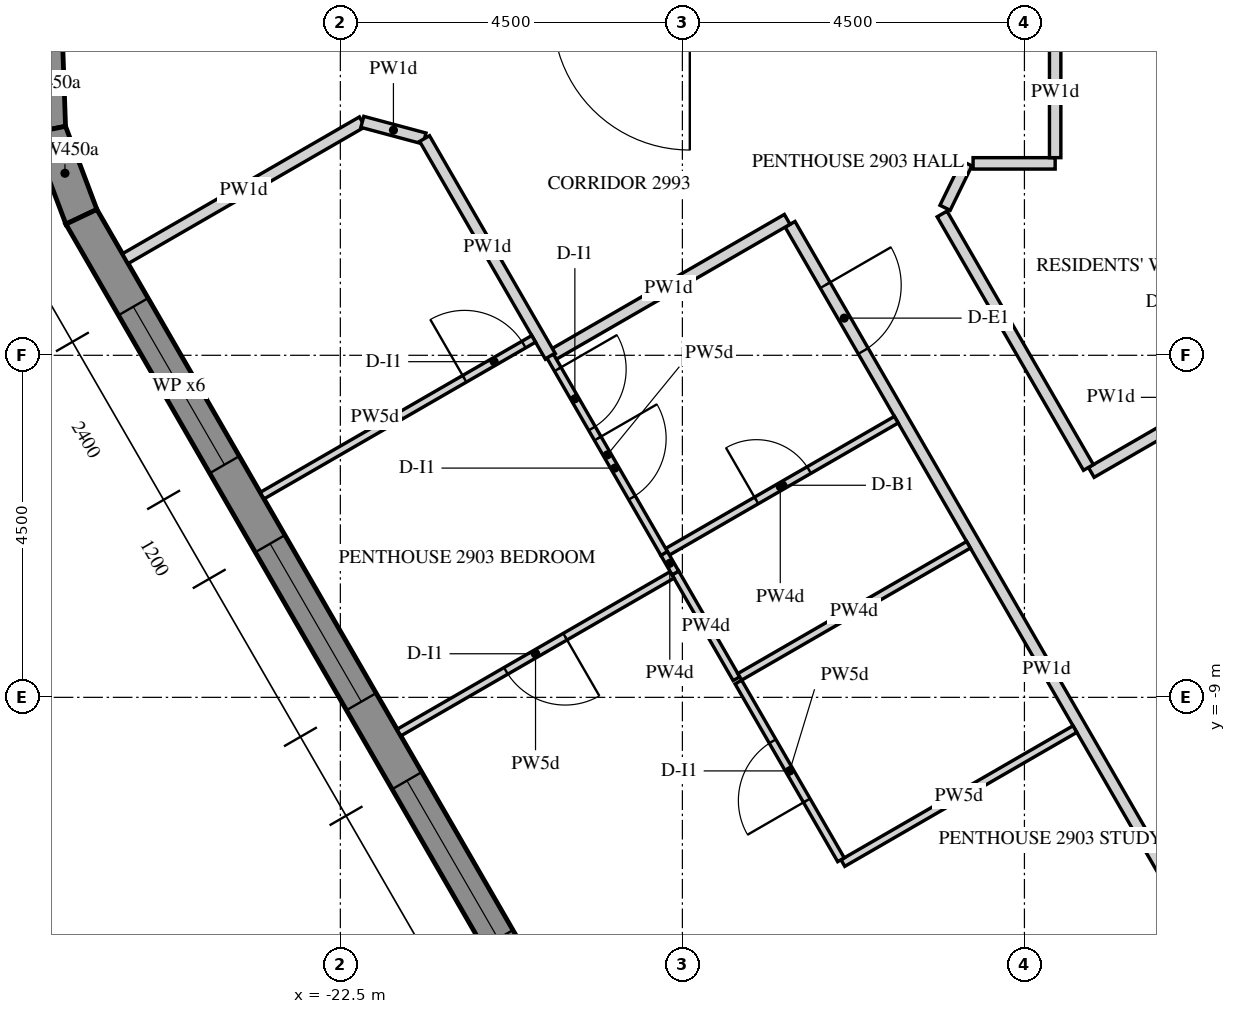
"""IFC4 building model, lengths in metres.
Left out: names, types, materials, properties, quantities, classifications, styles, units other than length and angle.
Written with IfcOpenShell. Run it as: python <this file> out.ifc"""

import sys

from ifc_helpers import new_model, si_unit, direction, frame, frame_2d, origin, place, context, subcontext, project, spatial, polyline, rectangle, outline, extrude, element, fill, save


model = new_model("IFC4")
c1 = context("Model", 3, precision=1e-05, world=origin(), true_north=direction((0.0, 1.0)))
c2 = subcontext(c1, "Body", "Model", "MODEL_VIEW")
j1 = project(units=[si_unit("LENGTHUNIT", "METRE"), si_unit("PLANEANGLEUNIT", "RADIAN")], contexts=[c1])
p1 = place(None, origin())
s1 = spatial("IfcSite", under=j1, at=p1, CompositionType="ELEMENT")
p2 = place(p1, origin())
s2 = spatial("IfcBuilding", under=s1, at=p2, CompositionType="ELEMENT")
p3 = place(p2, frame((0.0, 0.0, 372.9)))
s3 = spatial("IfcBuildingStorey", under=s2, at=p3, CompositionType="ELEMENT", Elevation=372.9)
p4 = place(p3, frame((-26.382, -0.309, -0.15), z_axis=(0.0, 0.0, 1.0), x_axis=(0.034887984255, -0.999391228976, 0.0)))
e1 = element("IfcWall", 1, at=p4, inside=s3, PredefinedType="SOLIDWALL", context=c2, shape_type="SweptSolid", body=[
    extrude(outline(polyline([(-0.037, -0.225), (1.261, -0.225), (1.188, 0.225), (0.037, 0.225), (-0.037, -0.225)])), origin(), (0.0, 0.0, 1.0), 3.55),
])
p5 = place(p3, frame((-26.339, -1.532, -0.15), z_axis=(0.0, 0.0, 1.0), x_axis=(0.353132996235, -0.935573132882, 0.0)))
e2 = element("IfcWall", 2, at=p5, inside=s3, PredefinedType="SOLIDWALL", context=c2, shape_type="SweptSolid", body=[
    extrude(outline(polyline([(-0.037, -0.225), (1.243, -0.225), (1.206, 0.225), (0.037, 0.225), (-0.037, -0.225)])), origin(), (0.0, 0.0, 1.0), 3.55),
])
p6 = place(p3, frame((-25.907, -2.678, -0.15), z_axis=(0.0, 0.0, 1.0), x_axis=(0.499997453958, -0.866026873738, 0.0)))
e3 = element("IfcWall", 3, at=p6, inside=s3, PredefinedType="SOLIDWALL", context=c2, shape_type="SweptSolid", body=[
    extrude(outline(polyline([(-0.018, -0.225), (23.152, -0.225), (23.11, 0.225), (0.018, 0.225), (-0.018, -0.225)])), origin(), (0.0, 0.0, 1.0), 3.55),
])
p7 = place(p6, frame((1.366, 0.0, 0.45)))
e4 = element("IfcOpeningElement", 4, at=p7, cuts=e3, PredefinedType="OPENING", context=c2, shape_type="SweptSolid", body=[
    extrude(rectangle(XDim=2.4, YDim=3.0, at=frame_2d((1.2, 1.5))), frame((0.0, 0.235, 0.0), z_axis=(0.0, -1.0, 0.0), x_axis=(1.0, 0.0, 0.0)), (0.0, 0.0, 1.0), 0.47),
])
p8 = place(p6, frame((4.966, 0.0, 0.45)))
e5 = element("IfcOpeningElement", 5, at=p8, cuts=e3, PredefinedType="OPENING", context=c2, shape_type="SweptSolid", body=[
    extrude(rectangle(XDim=2.4, YDim=3.0, at=frame_2d((1.2, 1.5))), frame((0.0, 0.235, 0.0), z_axis=(0.0, -1.0, 0.0), x_axis=(1.0, 0.0, 0.0)), (0.0, 0.0, 1.0), 0.47),
])
p9 = place(p6, frame((8.566, 0.0, 0.45)))
e6 = element("IfcOpeningElement", 6, at=p9, cuts=e3, PredefinedType="OPENING", context=c2, shape_type="SweptSolid", body=[
    extrude(rectangle(XDim=2.4, YDim=3.0, at=frame_2d((1.2, 1.5))), frame((0.0, 0.235, 0.0), z_axis=(0.0, -1.0, 0.0), x_axis=(1.0, 0.0, 0.0)), (0.0, 0.0, 1.0), 0.47),
])
p10 = place(p6, frame((12.166, 0.0, 0.45)))
e7 = element("IfcOpeningElement", 7, at=p10, cuts=e3, PredefinedType="OPENING", context=c2, shape_type="SweptSolid", body=[
    extrude(rectangle(XDim=2.4, YDim=3.0, at=frame_2d((1.2, 1.5))), frame((0.0, 0.235, 0.0), z_axis=(0.0, -1.0, 0.0), x_axis=(1.0, 0.0, 0.0)), (0.0, 0.0, 1.0), 0.47),
])
p11 = place(p6, frame((15.766, 0.0, 0.45)))
e8 = element("IfcOpeningElement", 8, at=p11, cuts=e3, PredefinedType="OPENING", context=c2, shape_type="SweptSolid", body=[
    extrude(rectangle(XDim=2.4, YDim=3.0, at=frame_2d((1.2, 1.5))), frame((0.0, 0.235, 0.0), z_axis=(0.0, -1.0, 0.0), x_axis=(1.0, 0.0, 0.0)), (0.0, 0.0, 1.0), 0.47),
])
p12 = place(p6, frame((19.366, 0.0, 0.45)))
e9 = element("IfcOpeningElement", 9, at=p12, cuts=e3, PredefinedType="OPENING", context=c2, shape_type="SweptSolid", body=[
    extrude(rectangle(XDim=2.4, YDim=3.0, at=frame_2d((1.2, 1.5))), frame((0.0, 0.235, 0.0), z_axis=(0.0, -1.0, 0.0), x_axis=(1.0, 0.0, 0.0)), (0.0, 0.0, 1.0), 0.47),
])
p13 = place(p3, frame((-16.583, -2.777, 0.0), z_axis=(0.0, 0.0, 1.0), x_axis=(0.50000467473, -0.866022704811, 0.0)))
e10 = element("IfcWall", 10, at=p13, inside=s3, PredefinedType="PARTITIONING", context=c2, shape_type="SweptSolid", body=[
    extrude(rectangle(XDim=13.504, YDim=0.15, at=frame_2d((6.752, 0.0))), origin(), (0.0, 0.0, 1.0), 2.47),
])
p14 = place(p13, frame((0.925, 0.0, 0.0)))
e11 = element("IfcOpeningElement", 11, at=p14, cuts=e10, PredefinedType="OPENING", context=c2, shape_type="SweptSolid", body=[
    extrude(rectangle(XDim=1.0, YDim=2.1, at=frame_2d((0.5, 1.05))), frame((0.0, 0.085, 0.0), z_axis=(0.0, -1.0, 0.0), x_axis=(1.0, 0.0, 0.0)), (0.0, 0.0, 1.0), 0.17),
])
p15 = place(p3, frame((-19.739, -4.512, 0.0), z_axis=(0.0, 0.0, 1.0), x_axis=(0.866018442252, 0.500012057535, 0.0)))
e12 = element("IfcWall", 12, at=p15, inside=s3, PredefinedType="PARTITIONING", context=c2, shape_type="SweptSolid", body=[
    extrude(rectangle(XDim=3.6, YDim=0.15, at=frame_2d((1.8, 0.0))), origin(), (0.0, 0.0, 1.0), 2.47),
])
p16 = place(p3, frame((-25.329, -3.229, 0.0), z_axis=(0.0, 0.0, 1.0), x_axis=(0.866030854095, 0.499990559667, 0.0)))
e13 = element("IfcWall", 13, at=p16, inside=s3, PredefinedType="PARTITIONING", context=c2, shape_type="SweptSolid", body=[
    extrude(rectangle(XDim=3.6, YDim=0.15, at=frame_2d((1.8, 0.0))), origin(), (0.0, 0.0, 1.0), 2.47),
])
p17 = place(p3, frame((-22.211, -1.429, 0.0), z_axis=(0.0, 0.0, 1.0), x_axis=(0.965937762102, -0.258774495933, 0.0)))
e14 = element("IfcWall", 14, at=p17, inside=s3, PredefinedType="PARTITIONING", context=c2, shape_type="SweptSolid", body=[
    extrude(rectangle(XDim=0.847, YDim=0.15, at=frame_2d((0.424, 0.0))), origin(), (0.0, 0.0, 1.0), 2.47),
])
p18 = place(p3, frame((-21.392, -1.648, 0.0), z_axis=(0.0, 0.0, 1.0), x_axis=(0.500018282537, -0.866014848099, 0.0)))
e15 = element("IfcWall", 15, at=p18, inside=s3, PredefinedType="PARTITIONING", context=c2, shape_type="SweptSolid", body=[
    extrude(rectangle(XDim=3.31, YDim=0.15, at=frame_2d((1.655, 0.0))), origin(), (0.0, 0.0, 1.0), 2.47),
])
p19 = place(p3, frame((-9.2, -4.066, 0.0), z_axis=(0.0, 0.0, 1.0), x_axis=(-0.866020906874, -0.500007788796, 0.0)))
e16 = element("IfcWall", 16, at=p19, inside=s3, PredefinedType="PARTITIONING", context=c2, shape_type="SweptSolid", body=[
    extrude(rectangle(XDim=3.95, YDim=0.15, at=frame_2d((1.975, 0.0))), origin(), (0.0, 0.0, 1.0), 2.47),
])
p20 = place(p19, frame((1.525, 0.0, 0.0)))
e17 = element("IfcOpeningElement", 17, at=p20, cuts=e16, PredefinedType="OPENING", context=c2, shape_type="SweptSolid", body=[
    extrude(rectangle(XDim=0.9, YDim=2.1, at=frame_2d((0.45, 1.05))), frame((0.0, 0.085, 0.0), z_axis=(0.0, -1.0, 0.0), x_axis=(1.0, 0.0, 0.0)), (0.0, 0.0, 1.0), 0.17),
])
p21 = place(p3, frame((-12.658, -5.976, 0.0), z_axis=(0.0, 0.0, 1.0), x_axis=(-0.499991345342, 0.866030400496, 0.0)))
e18 = element("IfcWall", 18, at=p21, inside=s3, PredefinedType="PARTITIONING", context=c2, shape_type="SweptSolid", body=[
    extrude(rectangle(XDim=3.851, YDim=0.15, at=frame_2d((1.926, 0.0))), origin(), (0.0, 0.0, 1.0), 2.47),
])
p22 = place(p3, frame((-14.544, -2.559, 0.0), z_axis=(0.0, 0.0, 1.0), x_axis=(0.438630789999, 0.898667363414, 0.0)))
e19 = element("IfcWall", 19, at=p22, inside=s3, PredefinedType="PARTITIONING", context=c2, shape_type="SweptSolid", body=[
    extrude(rectangle(XDim=0.65, YDim=0.15, at=frame_2d((0.325, 0.0))), origin(), (0.0, 0.0, 1.0), 2.47),
])
p23 = place(p3, frame((-14.176, -1.975, 0.0), z_axis=(0.0, 0.0, 1.0), x_axis=(1.0, 0.0, 0.0)))
e20 = element("IfcWall", 20, at=p23, inside=s3, PredefinedType="PARTITIONING", context=c2, shape_type="SweptSolid", body=[
    extrude(rectangle(XDim=1.08, YDim=0.15, at=frame_2d((0.54, 0.0))), origin(), (0.0, 0.0, 1.0), 2.47),
])
p24 = place(p3, frame((-13.096, -1.9, 0.0), z_axis=(0.0, 0.0, 1.0), x_axis=(0.0, 1.0, 0.0)))
e21 = element("IfcWall", 21, at=p24, inside=s3, PredefinedType="PARTITIONING", context=c2, shape_type="SweptSolid", body=[
    extrude(rectangle(XDim=1.725, YDim=0.15, at=frame_2d((0.862, 0.0))), origin(), (0.0, 0.0, 1.0), 2.47),
])
p25 = place(p3, frame((-17.289, -8.755, 0.0), z_axis=(0.0, 0.0, 1.0), x_axis=(-0.499958946799, 0.866049104564, 0.0)))
e22 = element("IfcWall", 22, at=p25, inside=s3, PredefinedType="PARTITIONING", context=c2, shape_type="SweptSolid", body=[
    extrude(rectangle(XDim=1.609, YDim=0.1, at=frame_2d((0.804, 0.0))), origin(), (0.0, 0.0, 1.0), 2.47),
])
p26 = place(p3, frame((-18.135, -7.389, 0.0), z_axis=(0.0, 0.0, 1.0), x_axis=(-0.86602981871, -0.499992353047, 0.0)))
e23 = element("IfcWall", 23, at=p26, inside=s3, PredefinedType="PARTITIONING", context=c2, shape_type="SweptSolid", body=[
    extrude(rectangle(XDim=4.15, YDim=0.1, at=frame_2d((2.075, 0.0))), origin(), (0.0, 0.0, 1.0), 2.47),
])
p27 = place(p26, frame((1.625, 0.0, 0.0)))
e24 = element("IfcOpeningElement", 24, at=p27, cuts=e23, PredefinedType="OPENING", context=c2, shape_type="SweptSolid", body=[
    extrude(rectangle(XDim=0.9, YDim=2.1, at=frame_2d((0.45, 1.05))), frame((0.0, 0.06, 0.0), z_axis=(0.0, -1.0, 0.0), x_axis=(1.0, 0.0, 0.0)), (0.0, 0.0, 1.0), 0.12),
])
p28 = place(p3, frame((-12.836, -9.418, 0.0), z_axis=(0.0, 0.0, 1.0), x_axis=(-0.866031034943, -0.499990246421, 0.0)))
e25 = element("IfcWall", 25, at=p28, inside=s3, PredefinedType="PARTITIONING", context=c2, shape_type="SweptSolid", body=[
    extrude(rectangle(XDim=3.525, YDim=0.1, at=frame_2d((1.762, 0.0))), origin(), (0.0, 0.0, 1.0), 2.47),
])
p29 = place(p3, frame((-15.914, -11.137, 0.0), z_axis=(0.0, 0.0, 1.0), x_axis=(-0.50000943426, 0.866019956843, 0.0)))
e26 = element("IfcWall", 26, at=p29, inside=s3, PredefinedType="PARTITIONING", context=c2, shape_type="SweptSolid", body=[
    extrude(rectangle(XDim=2.7, YDim=0.1, at=frame_2d((1.35, 0.0))), origin(), (0.0, 0.0, 1.0), 2.47),
])
p30 = place(p29, frame((0.9, 0.0, 0.0)))
e27 = element("IfcOpeningElement", 27, at=p30, cuts=e26, PredefinedType="OPENING", context=c2, shape_type="SweptSolid", body=[
    extrude(rectangle(XDim=0.9, YDim=2.1, at=frame_2d((0.45, 1.05))), frame((0.0, 0.06, 0.0), z_axis=(0.0, -1.0, 0.0), x_axis=(1.0, 0.0, 0.0)), (0.0, 0.0, 1.0), 0.12),
])
p31 = place(p3, frame((-18.239, -7.11, 0.0), z_axis=(0.0, 0.0, 1.0), x_axis=(0.866031034943, 0.499990246421, 0.0)))
e28 = element("IfcWall", 28, at=p31, inside=s3, PredefinedType="PARTITIONING", context=c2, shape_type="SweptSolid", body=[
    extrude(rectangle(XDim=3.525, YDim=0.1, at=frame_2d((1.762, 0.0))), origin(), (0.0, 0.0, 1.0), 2.47),
])
p32 = place(p31, frame((1.4, 0.0, 0.0)))
e29 = element("IfcOpeningElement", 29, at=p32, cuts=e28, PredefinedType="OPENING", context=c2, shape_type="SweptSolid", body=[
    extrude(rectangle(XDim=0.8, YDim=2.1, at=frame_2d((0.4, 1.05))), frame((0.0, 0.06, 0.0), z_axis=(0.0, -1.0, 0.0), x_axis=(1.0, 0.0, 0.0)), (0.0, 0.0, 1.0), 0.12),
])
p33 = place(p3, frame((-19.74, -4.51, 0.0), z_axis=(0.0, 0.0, 1.0), x_axis=(0.499985098601, -0.86603400694, 0.0)))
e30 = element("IfcWall", 30, at=p33, inside=s3, PredefinedType="PARTITIONING", context=c2, shape_type="SweptSolid", body=[
    extrude(rectangle(XDim=3.004, YDim=0.1, at=frame_2d((1.502, 0.0))), origin(), (0.0, 0.0, 1.0), 2.47),
])
p34 = place(p33, frame((0.2, 0.0, 0.0)))
e31 = element("IfcOpeningElement", 31, at=p34, cuts=e30, PredefinedType="OPENING", context=c2, shape_type="SweptSolid", body=[
    extrude(rectangle(XDim=0.9, YDim=2.1, at=frame_2d((0.45, 1.05))), frame((0.0, 0.06, 0.0), z_axis=(0.0, -1.0, 0.0), x_axis=(1.0, 0.0, 0.0)), (0.0, 0.0, 1.0), 0.12),
])
p35 = place(p33, frame((1.252, 0.0, 0.0)))
e32 = element("IfcOpeningElement", 32, at=p35, cuts=e30, PredefinedType="OPENING", context=c2, shape_type="SweptSolid", body=[
    extrude(rectangle(XDim=0.9, YDim=2.1, at=frame_2d((0.45, 1.05))), frame((0.0, 0.06, 0.0), z_axis=(0.0, -1.0, 0.0), x_axis=(1.0, 0.0, 0.0)), (0.0, 0.0, 1.0), 0.12),
])
p36 = place(p3, frame((-18.24, -7.108, 0.0), z_axis=(0.0, 0.0, 1.0), x_axis=(0.499960902066, -0.86604797581, 0.0)))
e33 = element("IfcWall", 33, at=p36, inside=s3, PredefinedType="PARTITIONING", context=c2, shape_type="SweptSolid", body=[
    extrude(rectangle(XDim=0.295, YDim=0.1, at=frame_2d((0.148, 0.0))), origin(), (0.0, 0.0, 1.0), 2.47),
])
p37 = place(p3, frame((-17.245, -8.73, 0.0), z_axis=(0.0, 0.0, 1.0), x_axis=(0.866055725969, 0.499947476758, 0.0)))
e34 = element("IfcWall", 34, at=p37, inside=s3, PredefinedType="PARTITIONING", context=c2, shape_type="SweptSolid", body=[
    extrude(rectangle(XDim=3.475, YDim=0.1, at=frame_2d((1.737, 0.0))), origin(), (0.0, 0.0, 1.0), 2.47),
])
p38 = place(p3, frame((-23.529, -6.346, 0.0), z_axis=(0.0, 0.0, 1.0), x_axis=(0.866019999656, 0.500009360108, 0.0)))
e35 = element("IfcWall", 35, at=p38, inside=s3, PredefinedType="PARTITIONING", context=c2, shape_type="SweptSolid", body=[
    extrude(rectangle(XDim=4.125, YDim=0.1, at=frame_2d((2.062, 0.0))), origin(), (0.0, 0.0, 1.0), 2.47),
])
p39 = place(p38, frame((3.075, 0.0, 0.0)))
e36 = element("IfcOpeningElement", 36, at=p39, cuts=e35, PredefinedType="OPENING", context=c2, shape_type="SweptSolid", body=[
    extrude(rectangle(XDim=0.9, YDim=2.1, at=frame_2d((0.45, 1.05))), frame((0.0, 0.06, 0.0), z_axis=(0.0, -1.0, 0.0), x_axis=(1.0, 0.0, 0.0)), (0.0, 0.0, 1.0), 0.12),
])
p40 = place(p7, frame((0.0, 0.155, 0.0)))
e37 = element("IfcWindow", 37, at=p40, inside=s3, PartitioningType="DOUBLE_PANEL_VERTICAL", PredefinedType="WINDOW", context=c2, shape_type="SweptSolid", body=[
    extrude(rectangle(XDim=2.4, YDim=3.0, at=frame_2d((1.2, 1.5))), frame((0.0, 0.03, 0.0), z_axis=(0.0, -1.0, 0.0), x_axis=(1.0, 0.0, 0.0)), (0.0, 0.0, 1.0), 0.06),
])
fill(e4, e37)
p41 = place(p8, frame((0.0, 0.155, 0.0)))
e38 = element("IfcWindow", 38, at=p41, inside=s3, PartitioningType="DOUBLE_PANEL_VERTICAL", PredefinedType="WINDOW", context=c2, shape_type="SweptSolid", body=[
    extrude(rectangle(XDim=2.4, YDim=3.0, at=frame_2d((1.2, 1.5))), frame((0.0, 0.03, 0.0), z_axis=(0.0, -1.0, 0.0), x_axis=(1.0, 0.0, 0.0)), (0.0, 0.0, 1.0), 0.06),
])
fill(e5, e38)
p42 = place(p9, frame((0.0, 0.155, 0.0)))
e39 = element("IfcWindow", 39, at=p42, inside=s3, PartitioningType="DOUBLE_PANEL_VERTICAL", PredefinedType="WINDOW", context=c2, shape_type="SweptSolid", body=[
    extrude(rectangle(XDim=2.4, YDim=3.0, at=frame_2d((1.2, 1.5))), frame((0.0, 0.03, 0.0), z_axis=(0.0, -1.0, 0.0), x_axis=(1.0, 0.0, 0.0)), (0.0, 0.0, 1.0), 0.06),
])
fill(e6, e39)
p43 = place(p14, origin())
e40 = element("IfcDoor", 40, at=p43, inside=s3, OperationType="SINGLE_SWING_RIGHT", PredefinedType="DOOR", context=c2, shape_type="SweptSolid", body=[
    extrude(rectangle(XDim=1.0, YDim=2.1, at=frame_2d((0.5, 1.05))), frame((0.0, 0.025, 0.0), z_axis=(0.0, -1.0, 0.0), x_axis=(1.0, 0.0, 0.0)), (0.0, 0.0, 1.0), 0.05),
])
fill(e11, e40)
p44 = place(p32, origin())
e41 = element("IfcDoor", 41, at=p44, inside=s3, OperationType="SINGLE_SWING_LEFT", PredefinedType="DOOR", context=c2, shape_type="SweptSolid", body=[
    extrude(rectangle(XDim=0.8, YDim=2.1, at=frame_2d((0.4, 1.05))), frame((0.0, 0.025, 0.0), z_axis=(0.0, -1.0, 0.0), x_axis=(1.0, 0.0, 0.0)), (0.0, 0.0, 1.0), 0.05),
])
fill(e29, e41)
p45 = place(p34, origin())
e42 = element("IfcDoor", 42, at=p45, inside=s3, OperationType="SINGLE_SWING_LEFT", PredefinedType="DOOR", context=c2, shape_type="SweptSolid", body=[
    extrude(rectangle(XDim=0.9, YDim=2.1, at=frame_2d((0.45, 1.05))), frame((0.0, 0.025, 0.0), z_axis=(0.0, -1.0, 0.0), x_axis=(1.0, 0.0, 0.0)), (0.0, 0.0, 1.0), 0.05),
])
fill(e31, e42)
p46 = place(p39, origin())
e43 = element("IfcDoor", 43, at=p46, inside=s3, OperationType="SINGLE_SWING_RIGHT", PredefinedType="DOOR", context=c2, shape_type="SweptSolid", body=[
    extrude(rectangle(XDim=0.9, YDim=2.1, at=frame_2d((0.45, 1.05))), frame((0.0, 0.025, 0.0), z_axis=(0.0, -1.0, 0.0), x_axis=(1.0, 0.0, 0.0)), (0.0, 0.0, 1.0), 0.05),
])
fill(e36, e43)
p47 = place(p35, origin())
e44 = element("IfcDoor", 44, at=p47, inside=s3, OperationType="SINGLE_SWING_LEFT", PredefinedType="DOOR", context=c2, shape_type="SweptSolid", body=[
    extrude(rectangle(XDim=0.9, YDim=2.1, at=frame_2d((0.45, 1.05))), frame((0.0, 0.025, 0.0), z_axis=(0.0, -1.0, 0.0), x_axis=(1.0, 0.0, 0.0)), (0.0, 0.0, 1.0), 0.05),
])
fill(e32, e44)
p48 = place(p30, origin())
e45 = element("IfcDoor", 45, at=p48, inside=s3, OperationType="SINGLE_SWING_LEFT", PredefinedType="DOOR", context=c2, shape_type="SweptSolid", body=[
    extrude(rectangle(XDim=0.9, YDim=2.1, at=frame_2d((0.45, 1.05))), frame((0.0, 0.025, 0.0), z_axis=(0.0, -1.0, 0.0), x_axis=(1.0, 0.0, 0.0)), (0.0, 0.0, 1.0), 0.05),
])
fill(e27, e45)
p49 = place(p27, origin())
e46 = element("IfcDoor", 46, at=p49, inside=s3, OperationType="SINGLE_SWING_RIGHT", PredefinedType="DOOR", context=c2, shape_type="SweptSolid", body=[
    extrude(rectangle(XDim=0.9, YDim=2.1, at=frame_2d((0.45, 1.05))), frame((0.0, 0.025, 0.0), z_axis=(0.0, -1.0, 0.0), x_axis=(1.0, 0.0, 0.0)), (0.0, 0.0, 1.0), 0.05),
])
fill(e24, e46)
save(model, sys.argv[1])
